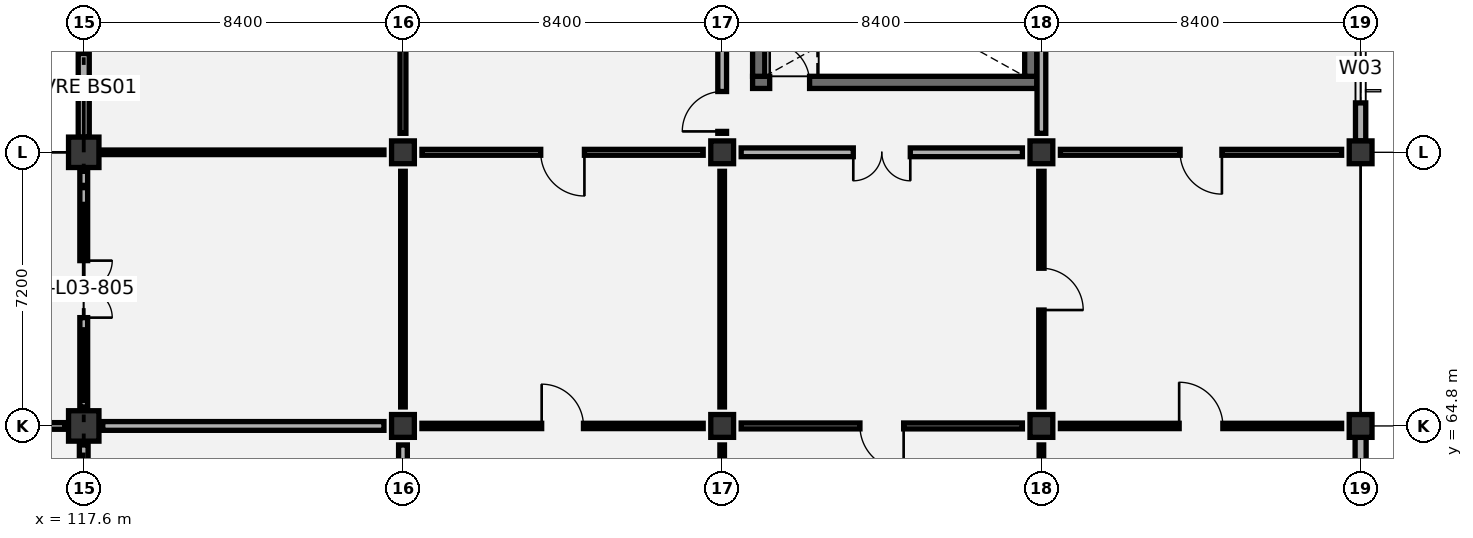
"""IFC4 building model, lengths in metres.
Left out: names, types, materials, properties, quantities, classifications, styles, units other than length and angle.
Written with IfcOpenShell. Run it as: python <this file> out.ifc"""

import sys

from ifc_helpers import new_model, si_unit, direction, frame, frame_2d, origin, origin_2d, place, context, subcontext, project, spatial, rectangle, extrude, element, fill, save


model = new_model("IFC4")
c1 = context("Model", 3, precision=1e-05, world=origin(), true_north=direction((0.0, 1.0)))
c2 = subcontext(c1, "Body", "Model", "MODEL_VIEW")
j1 = project(units=[si_unit("LENGTHUNIT", "METRE"), si_unit("PLANEANGLEUNIT", "RADIAN")], contexts=[c1])
p1 = place(None, origin())
s1 = spatial("IfcSite", under=j1, at=p1, CompositionType="ELEMENT")
p2 = place(p1, origin())
s2 = spatial("IfcBuilding", under=s1, at=p2, CompositionType="ELEMENT")
p3 = place(p2, frame((0.0, 0.0, 16.8)))
s3 = spatial("IfcBuildingStorey", under=s2, at=p3, CompositionType="ELEMENT", Elevation=16.8)
for number, where, z_axis, x_axis in (
    (1, (117.6, 64.8, 0.0), (0.0, 0.0, 1.0), (1.0, 0.0, 0.0)),
    (2, (117.6, 72.0, 0.0), (0.0, 0.0, 1.0), (1.0, 0.0, 0.0)),
):
    element("IfcColumn", number, at=place(p3, frame(where, z_axis=z_axis, x_axis=x_axis)), inside=s3, PredefinedType="COLUMN", context=c2, shape_type="SweptSolid", body=[
        extrude(rectangle(XDim=0.8, YDim=0.8, at=origin_2d()), origin(), (0.0, 0.0, 1.0), 5.4),
    ])
for number, where, z_axis, x_axis in (
    (3, (126.0, 64.8, 0.0), (0.0, 0.0, 1.0), (1.0, 0.0, 0.0)),
    (4, (126.0, 72.0, 0.0), (0.0, 0.0, 1.0), (1.0, 0.0, 0.0)),
    (5, (134.4, 64.8, 0.0), (0.0, 0.0, 1.0), (1.0, 0.0, 0.0)),
    (6, (134.4, 72.0, 0.0), (0.0, 0.0, 1.0), (1.0, 0.0, 0.0)),
    (7, (142.8, 64.8, 0.0), (0.0, 0.0, 1.0), (1.0, 0.0, 0.0)),
    (8, (142.8, 72.0, 0.0), (0.0, 0.0, 1.0), (1.0, 0.0, 0.0)),
    (9, (151.2, 64.8, 0.0), (0.0, 0.0, 1.0), (1.0, 0.0, 0.0)),
    (10, (151.2, 72.0, 0.0), (0.0, 0.0, 1.0), (1.0, 0.0, 0.0)),
):
    element("IfcColumn", number, at=place(p3, frame(where, z_axis=z_axis, x_axis=x_axis)), inside=s3, PredefinedType="COLUMN", context=c2, shape_type="SweptSolid", body=[
        extrude(rectangle(XDim=0.6, YDim=0.6, at=origin_2d()), origin(), (0.0, 0.0, 1.0), 5.4),
    ])
p4 = place(p3, frame((135.2, 73.84, 0.0), z_axis=(0.0, 0.0, 1.0), x_axis=(1.0, 0.0, 0.0)))
e11 = element("IfcWall", 11, at=p4, inside=s3, PredefinedType="SHEAR", context=c2, shape_type="SweptSolid", body=[
    extrude(rectangle(XDim=7.48, YDim=0.32, at=frame_2d((3.74, 0.0))), origin(), (0.0, 0.0, 1.0), 4.825),
])
p5 = place(p4, frame((0.45, 0.0, 0.0)))
e12 = element("IfcOpeningElement", 12, at=p5, cuts=e11, PredefinedType="OPENING", context=c2, shape_type="SweptSolid", body=[
    extrude(rectangle(XDim=1.05, YDim=2.15, at=frame_2d((0.525, 1.075))), frame((0.0, 0.17, 0.0), z_axis=(0.0, -1.0, 0.0), x_axis=(1.0, 0.0, 0.0)), (0.0, 0.0, 1.0), 0.34),
])
for number, where, z_axis, x_axis in (
    (13, (135.36, 74.0, 0.0), (0.0, 0.0, 1.0), (0.0, 1.0, 0.0)),
    (14, (142.52, 74.0, 0.0), (0.0, 0.0, 1.0), (0.0, 1.0, 0.0)),
):
    element("IfcWall", number, at=place(p3, frame(where, z_axis=z_axis, x_axis=x_axis)), inside=s3, PredefinedType="SHEAR", context=c2, shape_type="SweptSolid", body=[
        extrude(rectangle(XDim=3.8, YDim=0.32, at=frame_2d((1.9, 0.0))), origin(), (0.0, 0.0, 1.0), 4.825),
    ])
p6 = place(p3, frame((117.6, 72.4, 0.0), z_axis=(0.0, 0.0, 1.0), x_axis=(0.0, 1.0, 0.0)))
e15 = element("IfcWall", 15, at=p6, inside=s3, PredefinedType="SOLIDWALL", context=c2, shape_type="SweptSolid", body=[
    extrude(rectangle(XDim=6.5, YDim=0.29, at=frame_2d((3.25, 0.0))), origin(), (0.0, 0.0, 1.0), 4.17),
])
p7 = place(p6, frame((2.2, 0.0, 0.9)))
e16 = element("IfcOpeningElement", 16, at=p7, cuts=e15, PredefinedType="OPENING", context=c2, shape_type="SweptSolid", body=[
    extrude(rectangle(XDim=2.1, YDim=1.8, at=frame_2d((1.05, 0.9))), frame((0.0, 0.155, 0.0), z_axis=(0.0, -1.0, 0.0), x_axis=(1.0, 0.0, 0.0)), (0.0, 0.0, 1.0), 0.31),
])
p8 = place(p3, frame((151.2, 57.9, 0.0), z_axis=(0.0, 0.0, 1.0), x_axis=(0.0, 1.0, 0.0)))
e17 = element("IfcWall", 17, at=p8, inside=s3, PredefinedType="SOLIDWALL", context=c2, shape_type="SweptSolid", body=[
    extrude(rectangle(XDim=6.6, YDim=0.29, at=frame_2d((3.3, 0.0))), origin(), (0.0, 0.0, 1.0), 4.395),
])
p9 = place(p8, frame((2.1, 0.0, 0.9)))
e18 = element("IfcOpeningElement", 18, at=p9, cuts=e17, PredefinedType="OPENING", context=c2, shape_type="SweptSolid", body=[
    extrude(rectangle(XDim=2.4, YDim=1.8, at=frame_2d((1.2, 0.9))), frame((0.0, 0.155, 0.0), z_axis=(0.0, -1.0, 0.0), x_axis=(1.0, 0.0, 0.0)), (0.0, 0.0, 1.0), 0.31),
])
p10 = place(p3, frame((151.2, 72.3, 0.0), z_axis=(0.0, 0.0, 1.0), x_axis=(0.0, 1.0, 0.0)))
e19 = element("IfcWall", 19, at=p10, inside=s3, PredefinedType="SOLIDWALL", context=c2, shape_type="SweptSolid", body=[
    extrude(rectangle(XDim=6.6, YDim=0.27, at=frame_2d((3.3, 0.0))), origin(), (0.0, 0.0, 1.0), 4.17),
])
p11 = place(p10, frame((1.0, 0.0, 0.9)))
e20 = element("IfcOpeningElement", 20, at=p11, cuts=e19, PredefinedType="OPENING", context=c2, shape_type="SweptSolid", body=[
    extrude(rectangle(XDim=1.8, YDim=1.8, at=frame_2d((0.9, 0.9))), frame((0.0, 0.145, 0.0), z_axis=(0.0, -1.0, 0.0), x_axis=(1.0, 0.0, 0.0)), (0.0, 0.0, 1.0), 0.29),
])
p12 = place(p10, frame((3.8, 0.0, 0.9)))
e21 = element("IfcOpeningElement", 21, at=p12, cuts=e19, PredefinedType="OPENING", context=c2, shape_type="SweptSolid", body=[
    extrude(rectangle(XDim=1.8, YDim=1.8, at=frame_2d((0.9, 0.9))), frame((0.0, 0.145, 0.0), z_axis=(0.0, -1.0, 0.0), x_axis=(1.0, 0.0, 0.0)), (0.0, 0.0, 1.0), 0.29),
])
p13 = place(p3, frame((117.6, 58.1, 0.0), z_axis=(0.0, 0.0, 1.0), x_axis=(0.0, 1.0, 0.0)))
e22 = element("IfcWall", 22, at=p13, inside=s3, PredefinedType="PARTITIONING", context=c2, shape_type="SweptSolid", body=[
    extrude(rectangle(XDim=6.2, YDim=0.23, at=frame_2d((3.1, 0.0))), origin(), (0.0, 0.0, 1.0), 4.245),
])
p14 = place(p3, frame((109.7, 64.8, 0.0), z_axis=(0.0, 0.0, 1.0), x_axis=(1.0, 0.0, 0.0)))
e23 = element("IfcWall", 23, at=p14, inside=s3, PredefinedType="PARTITIONING", context=c2, shape_type="SweptSolid", body=[
    extrude(rectangle(XDim=7.4, YDim=0.175, at=frame_2d((3.7, 0.0))), origin(), (0.0, 0.0, 1.0), 4.195),
])
p15 = place(p14, frame((3.075, 0.0, 0.0)))
e24 = element("IfcOpeningElement", 24, at=p15, cuts=e23, PredefinedType="OPENING", context=c2, shape_type="SweptSolid", body=[
    extrude(rectangle(XDim=1.25, YDim=2.1, at=frame_2d((0.625, 1.05))), frame((0.0, 0.097, 0.0), z_axis=(0.0, -1.0, 0.0), x_axis=(1.0, 0.0, 0.0)), (0.0, 0.0, 1.0), 0.195),
])
p16 = place(p3, frame((117.6, 65.3, 0.0), z_axis=(0.0, 0.0, 1.0), x_axis=(0.0, 1.0, 0.0)))
e25 = element("IfcWall", 25, at=p16, inside=s3, PredefinedType="PARTITIONING", context=c2, shape_type="SweptSolid", body=[
    extrude(rectangle(XDim=6.2, YDim=0.205, at=frame_2d((3.1, 0.0))), origin(), (0.0, 0.0, 1.0), 4.655),
])
p17 = place(p16, frame((2.35, 0.0, 0.0)))
e26 = element("IfcOpeningElement", 26, at=p17, cuts=e25, PredefinedType="OPENING", context=c2, shape_type="SweptSolid", body=[
    extrude(rectangle(XDim=1.5, YDim=2.2, at=frame_2d((0.75, 1.1))), frame((0.0, 0.113, 0.0), z_axis=(0.0, -1.0, 0.0), x_axis=(1.0, 0.0, 0.0)), (0.0, 0.0, 1.0), 0.225),
])
p18 = place(p3, frame((126.0, 58.1, 0.0), z_axis=(0.0, 0.0, 1.0), x_axis=(0.0, 1.0, 0.0)))
e27 = element("IfcWall", 27, at=p18, inside=s3, PredefinedType="PARTITIONING", context=c2, shape_type="SweptSolid", body=[
    extrude(rectangle(XDim=6.2, YDim=0.23, at=frame_2d((3.1, 0.0))), origin(), (0.0, 0.0, 1.0), 4.755),
])
p19 = place(p3, frame((118.1, 64.8, 0.0), z_axis=(0.0, 0.0, 1.0), x_axis=(1.0, 0.0, 0.0)))
e28 = element("IfcWall", 28, at=p19, inside=s3, PredefinedType="PARTITIONING", context=c2, shape_type="SweptSolid", body=[
    extrude(rectangle(XDim=7.4, YDim=0.23, at=frame_2d((3.7, 0.0))), origin(), (0.0, 0.0, 1.0), 4.295),
])
p20 = place(p3, frame((126.0, 65.3, 0.0), z_axis=(0.0, 0.0, 1.0), x_axis=(0.0, 1.0, 0.0)))
e29 = element("IfcWall", 29, at=p20, inside=s3, PredefinedType="PARTITIONING", context=c2, shape_type="SweptSolid", body=[
    extrude(rectangle(XDim=6.2, YDim=0.12, at=frame_2d((3.1, 0.0))), origin(), (0.0, 0.0, 1.0), 4.345),
])
p21 = place(p3, frame((118.1, 72.0, 0.0), z_axis=(0.0, 0.0, 1.0), x_axis=(1.0, 0.0, 0.0)))
e30 = element("IfcWall", 30, at=p21, inside=s3, PredefinedType="PARTITIONING", context=c2, shape_type="SweptSolid", body=[
    extrude(rectangle(XDim=7.4, YDim=0.12, at=frame_2d((3.7, 0.0))), origin(), (0.0, 0.0, 1.0), 4.07),
])
p22 = place(p3, frame((126.0, 72.5, 0.0), z_axis=(0.0, 0.0, 1.0), x_axis=(0.0, 1.0, 0.0)))
e31 = element("IfcWall", 31, at=p22, inside=s3, PredefinedType="PARTITIONING", context=c2, shape_type="SweptSolid", body=[
    extrude(rectangle(XDim=6.2, YDim=0.155, at=frame_2d((3.1, 0.0))), origin(), (0.0, 0.0, 1.0), 4.32),
])
p23 = place(p22, frame((2.525, 0.0, 0.0)))
e32 = element("IfcOpeningElement", 32, at=p23, cuts=e31, PredefinedType="OPENING", context=c2, shape_type="SweptSolid", body=[
    extrude(rectangle(XDim=1.15, YDim=2.1, at=frame_2d((0.575, 1.05))), frame((0.0, 0.087, 0.0), z_axis=(0.0, -1.0, 0.0), x_axis=(1.0, 0.0, 0.0)), (0.0, 0.0, 1.0), 0.175),
])
p24 = place(p3, frame((134.4, 58.1, 0.0), z_axis=(0.0, 0.0, 1.0), x_axis=(0.0, 1.0, 0.0)))
e33 = element("IfcWall", 33, at=p24, inside=s3, PredefinedType="PARTITIONING", context=c2, shape_type="SweptSolid", body=[
    extrude(rectangle(XDim=6.2, YDim=0.12, at=frame_2d((3.1, 0.0))), origin(), (0.0, 0.0, 1.0), 4.345),
])
p25 = place(p3, frame((126.5, 64.8, 0.0), z_axis=(0.0, 0.0, 1.0), x_axis=(1.0, 0.0, 0.0)))
e34 = element("IfcWall", 34, at=p25, inside=s3, PredefinedType="PARTITIONING", context=c2, shape_type="SweptSolid", body=[
    extrude(rectangle(XDim=7.4, YDim=0.14, at=frame_2d((3.7, 0.0))), origin(), (0.0, 0.0, 1.0), 4.295),
])
p26 = place(p25, frame((3.15, 0.0, 0.0)))
e35 = element("IfcOpeningElement", 35, at=p26, cuts=e34, PredefinedType="OPENING", context=c2, shape_type="SweptSolid", body=[
    extrude(rectangle(XDim=1.1, YDim=2.1, at=frame_2d((0.55, 1.05))), frame((0.0, 0.08, 0.0), z_axis=(0.0, -1.0, 0.0), x_axis=(1.0, 0.0, 0.0)), (0.0, 0.0, 1.0), 0.16),
])
p27 = place(p3, frame((134.4, 65.3, 0.0), z_axis=(0.0, 0.0, 1.0), x_axis=(0.0, 1.0, 0.0)))
e36 = element("IfcWall", 36, at=p27, inside=s3, PredefinedType="PARTITIONING", context=c2, shape_type="SweptSolid", body=[
    extrude(rectangle(XDim=6.2, YDim=0.12, at=frame_2d((3.1, 0.0))), origin(), (0.0, 0.0, 1.0), 4.545),
])
p28 = place(p3, frame((126.5, 72.0, 0.0), z_axis=(0.0, 0.0, 1.0), x_axis=(1.0, 0.0, 0.0)))
e37 = element("IfcWall", 37, at=p28, inside=s3, PredefinedType="PARTITIONING", context=c2, shape_type="SweptSolid", body=[
    extrude(rectangle(XDim=7.4, YDim=0.155, at=frame_2d((3.7, 0.0))), origin(), (0.0, 0.0, 1.0), 4.07),
])
p29 = place(p28, frame((3.125, 0.0, 0.0)))
e38 = element("IfcOpeningElement", 38, at=p29, cuts=e37, PredefinedType="OPENING", context=c2, shape_type="SweptSolid", body=[
    extrude(rectangle(XDim=1.15, YDim=2.1, at=frame_2d((0.575, 1.05))), frame((0.0, 0.087, 0.0), z_axis=(0.0, -1.0, 0.0), x_axis=(1.0, 0.0, 0.0)), (0.0, 0.0, 1.0), 0.175),
])
p30 = place(p3, frame((134.4, 72.5, 0.0), z_axis=(0.0, 0.0, 1.0), x_axis=(0.0, 1.0, 0.0)))
e39 = element("IfcWall", 39, at=p30, inside=s3, PredefinedType="PARTITIONING", context=c2, shape_type="SweptSolid", body=[
    extrude(rectangle(XDim=6.2, YDim=0.23, at=frame_2d((3.1, 0.0))), origin(), (0.0, 0.0, 1.0), 4.12),
])
p31 = place(p30, frame((0.05, 0.0, 0.0)))
e40 = element("IfcOpeningElement", 40, at=p31, cuts=e39, PredefinedType="OPENING", context=c2, shape_type="SweptSolid", body=[
    extrude(rectangle(XDim=1.05, YDim=2.15, at=frame_2d((0.525, 1.075))), frame((0.0, 0.125, 0.0), z_axis=(0.0, -1.0, 0.0), x_axis=(1.0, 0.0, 0.0)), (0.0, 0.0, 1.0), 0.25),
])
p32 = place(p3, frame((142.8, 58.1, 0.0), z_axis=(0.0, 0.0, 1.0), x_axis=(0.0, 1.0, 0.0)))
e41 = element("IfcWall", 41, at=p32, inside=s3, PredefinedType="PARTITIONING", context=c2, shape_type="SweptSolid", body=[
    extrude(rectangle(XDim=6.2, YDim=0.12, at=frame_2d((3.1, 0.0))), origin(), (0.0, 0.0, 1.0), 4.545),
])
p33 = place(p3, frame((134.9, 64.8, 0.0), z_axis=(0.0, 0.0, 1.0), x_axis=(1.0, 0.0, 0.0)))
e42 = element("IfcWall", 42, at=p33, inside=s3, PredefinedType="PARTITIONING", context=c2, shape_type="SweptSolid", body=[
    extrude(rectangle(XDim=7.4, YDim=0.155, at=frame_2d((3.7, 0.0))), origin(), (0.0, 0.0, 1.0), 4.295),
])
p34 = place(p33, frame((3.125, 0.0, 0.0)))
e43 = element("IfcOpeningElement", 43, at=p34, cuts=e42, PredefinedType="OPENING", context=c2, shape_type="SweptSolid", body=[
    extrude(rectangle(XDim=1.15, YDim=2.1, at=frame_2d((0.575, 1.05))), frame((0.0, 0.087, 0.0), z_axis=(0.0, -1.0, 0.0), x_axis=(1.0, 0.0, 0.0)), (0.0, 0.0, 1.0), 0.175),
])
p35 = place(p3, frame((142.8, 65.3, 0.0), z_axis=(0.0, 0.0, 1.0), x_axis=(0.0, 1.0, 0.0)))
e44 = element("IfcWall", 44, at=p35, inside=s3, PredefinedType="PARTITIONING", context=c2, shape_type="SweptSolid", body=[
    extrude(rectangle(XDim=6.2, YDim=0.14, at=frame_2d((3.1, 0.0))), origin(), (0.0, 0.0, 1.0), 4.345),
])
p36 = place(p35, frame((2.55, 0.0, 0.0)))
e45 = element("IfcOpeningElement", 45, at=p36, cuts=e44, PredefinedType="OPENING", context=c2, shape_type="SweptSolid", body=[
    extrude(rectangle(XDim=1.1, YDim=2.1, at=frame_2d((0.55, 1.05))), frame((0.0, 0.08, 0.0), z_axis=(0.0, -1.0, 0.0), x_axis=(1.0, 0.0, 0.0)), (0.0, 0.0, 1.0), 0.16),
])
p37 = place(p3, frame((134.9, 72.0, 0.0), z_axis=(0.0, 0.0, 1.0), x_axis=(1.0, 0.0, 0.0)))
e46 = element("IfcWall", 46, at=p37, inside=s3, PredefinedType="PARTITIONING", context=c2, shape_type="SweptSolid", body=[
    extrude(rectangle(XDim=7.4, YDim=0.23, at=frame_2d((3.7, 0.0))), origin(), (0.0, 0.0, 1.0), 4.07),
])
p38 = place(p37, frame((2.95, 0.0, 0.0)))
e47 = element("IfcOpeningElement", 47, at=p38, cuts=e46, PredefinedType="OPENING", context=c2, shape_type="SweptSolid", body=[
    extrude(rectangle(XDim=1.5, YDim=2.15, at=frame_2d((0.75, 1.075))), frame((0.0, 0.125, 0.0), z_axis=(0.0, -1.0, 0.0), x_axis=(1.0, 0.0, 0.0)), (0.0, 0.0, 1.0), 0.25),
])
p39 = place(p3, frame((142.8, 72.5, 0.0), z_axis=(0.0, 0.0, 1.0), x_axis=(0.0, 1.0, 0.0)))
e48 = element("IfcWall", 48, at=p39, inside=s3, PredefinedType="PARTITIONING", context=c2, shape_type="SweptSolid", body=[
    extrude(rectangle(XDim=6.2, YDim=0.23, at=frame_2d((3.1, 0.0))), origin(), (0.0, 0.0, 1.0), 4.42),
])
p40 = place(p3, frame((143.3, 64.8, 0.0), z_axis=(0.0, 0.0, 1.0), x_axis=(1.0, 0.0, 0.0)))
e49 = element("IfcWall", 49, at=p40, inside=s3, PredefinedType="PARTITIONING", context=c2, shape_type="SweptSolid", body=[
    extrude(rectangle(XDim=7.4, YDim=0.14, at=frame_2d((3.7, 0.0))), origin(), (0.0, 0.0, 1.0), 4.295),
])
p41 = place(p40, frame((3.125, 0.0, 0.0)))
e50 = element("IfcOpeningElement", 50, at=p41, cuts=e49, PredefinedType="OPENING", context=c2, shape_type="SweptSolid", body=[
    extrude(rectangle(XDim=1.15, YDim=2.1, at=frame_2d((0.575, 1.05))), frame((0.0, 0.08, 0.0), z_axis=(0.0, -1.0, 0.0), x_axis=(1.0, 0.0, 0.0)), (0.0, 0.0, 1.0), 0.16),
])
p42 = place(p3, frame((143.3, 72.0, 0.0), z_axis=(0.0, 0.0, 1.0), x_axis=(1.0, 0.0, 0.0)))
e51 = element("IfcWall", 51, at=p42, inside=s3, PredefinedType="PARTITIONING", context=c2, shape_type="SweptSolid", body=[
    extrude(rectangle(XDim=7.4, YDim=0.155, at=frame_2d((3.7, 0.0))), origin(), (0.0, 0.0, 1.0), 4.07),
])
p43 = place(p42, frame((3.15, 0.0, 0.0)))
e52 = element("IfcOpeningElement", 52, at=p43, cuts=e51, PredefinedType="OPENING", context=c2, shape_type="SweptSolid", body=[
    extrude(rectangle(XDim=1.1, YDim=2.1, at=frame_2d((0.55, 1.05))), frame((0.0, 0.087, 0.0), z_axis=(0.0, -1.0, 0.0), x_axis=(1.0, 0.0, 0.0)), (0.0, 0.0, 1.0), 0.175),
])
p44 = place(p7, origin())
e53 = element("IfcWindow", 53, at=p44, inside=s3, PartitioningType="SINGLE_PANEL", PredefinedType="WINDOW", context=c2, shape_type="SweptSolid", body=[
    extrude(rectangle(XDim=2.1, YDim=1.8, at=frame_2d((1.05, 0.9))), frame((0.0, 0.03, 0.0), z_axis=(0.0, -1.0, 0.0), x_axis=(1.0, 0.0, 0.0)), (0.0, 0.0, 1.0), 0.06),
])
fill(e16, e53)
p45 = place(p11, origin())
e54 = element("IfcWindow", 54, at=p45, inside=s3, PartitioningType="SINGLE_PANEL", PredefinedType="WINDOW", context=c2, shape_type="SweptSolid", body=[
    extrude(rectangle(XDim=1.8, YDim=1.8, at=frame_2d((0.9, 0.9))), frame((0.0, 0.03, 0.0), z_axis=(0.0, -1.0, 0.0), x_axis=(1.0, 0.0, 0.0)), (0.0, 0.0, 1.0), 0.06),
])
fill(e20, e54)
p46 = place(p5, origin())
e55 = element("IfcDoor", 55, at=p46, inside=s3, OperationType="SINGLE_SWING_LEFT", PredefinedType="DOOR", context=c2, shape_type="SweptSolid", body=[
    extrude(rectangle(XDim=1.05, YDim=2.15, at=frame_2d((0.525, 1.075))), frame((0.0, 0.025, 0.0), z_axis=(0.0, -1.0, 0.0), x_axis=(1.0, 0.0, 0.0)), (0.0, 0.0, 1.0), 0.05),
])
fill(e12, e55)
p47 = place(p17, frame((1.5, 0.0, 0.0), z_axis=(0.0, 0.0, 1.0), x_axis=(-1.0, 0.0, 0.0)))
e56 = element("IfcDoor", 56, at=p47, inside=s3, OperationType="DOUBLE_DOOR_SINGLE_SWING", PredefinedType="DOOR", context=c2, shape_type="SweptSolid", body=[
    extrude(rectangle(XDim=1.5, YDim=2.2, at=frame_2d((0.75, 1.1))), frame((0.0, 0.025, 0.0), z_axis=(0.0, -1.0, 0.0), x_axis=(1.0, 0.0, 0.0)), (0.0, 0.0, 1.0), 0.05),
])
fill(e26, e56)
p48 = place(p26, origin())
e57 = element("IfcDoor", 57, at=p48, inside=s3, OperationType="SINGLE_SWING_LEFT", PredefinedType="DOOR", context=c2, shape_type="SweptSolid", body=[
    extrude(rectangle(XDim=1.1, YDim=2.1, at=frame_2d((0.55, 1.05))), frame((0.0, 0.025, 0.0), z_axis=(0.0, -1.0, 0.0), x_axis=(1.0, 0.0, 0.0)), (0.0, 0.0, 1.0), 0.05),
])
fill(e35, e57)
p49 = place(p29, frame((1.15, 0.0, 0.0), z_axis=(0.0, 0.0, 1.0), x_axis=(-1.0, 0.0, 0.0)))
e58 = element("IfcDoor", 58, at=p49, inside=s3, OperationType="SINGLE_SWING_LEFT", PredefinedType="DOOR", context=c2, shape_type="SweptSolid", body=[
    extrude(rectangle(XDim=1.15, YDim=2.1, at=frame_2d((0.575, 1.05))), frame((0.0, 0.025, 0.0), z_axis=(0.0, -1.0, 0.0), x_axis=(1.0, 0.0, 0.0)), (0.0, 0.0, 1.0), 0.05),
])
fill(e38, e58)
p50 = place(p31, origin())
e59 = element("IfcDoor", 59, at=p50, inside=s3, OperationType="SINGLE_SWING_LEFT", PredefinedType="DOOR", context=c2, shape_type="SweptSolid", body=[
    extrude(rectangle(XDim=1.05, YDim=2.15, at=frame_2d((0.525, 1.075))), frame((0.0, 0.025, 0.0), z_axis=(0.0, -1.0, 0.0), x_axis=(1.0, 0.0, 0.0)), (0.0, 0.0, 1.0), 0.05),
])
fill(e40, e59)
p51 = place(p34, frame((1.15, 0.0, 0.0), z_axis=(0.0, 0.0, 1.0), x_axis=(-1.0, 0.0, 0.0)))
e60 = element("IfcDoor", 60, at=p51, inside=s3, OperationType="SINGLE_SWING_LEFT", PredefinedType="DOOR", context=c2, shape_type="SweptSolid", body=[
    extrude(rectangle(XDim=1.15, YDim=2.1, at=frame_2d((0.575, 1.05))), frame((0.0, 0.025, 0.0), z_axis=(0.0, -1.0, 0.0), x_axis=(1.0, 0.0, 0.0)), (0.0, 0.0, 1.0), 0.05),
])
fill(e43, e60)
p52 = place(p36, frame((1.1, 0.0, 0.0), z_axis=(0.0, 0.0, 1.0), x_axis=(-1.0, 0.0, 0.0)))
e61 = element("IfcDoor", 61, at=p52, inside=s3, OperationType="SINGLE_SWING_RIGHT", PredefinedType="DOOR", context=c2, shape_type="SweptSolid", body=[
    extrude(rectangle(XDim=1.1, YDim=2.1, at=frame_2d((0.55, 1.05))), frame((0.0, 0.025, 0.0), z_axis=(0.0, -1.0, 0.0), x_axis=(1.0, 0.0, 0.0)), (0.0, 0.0, 1.0), 0.05),
])
fill(e45, e61)
p53 = place(p38, frame((1.5, 0.0, 0.0), z_axis=(0.0, 0.0, 1.0), x_axis=(-1.0, 0.0, 0.0)))
e62 = element("IfcDoor", 62, at=p53, inside=s3, OperationType="DOUBLE_DOOR_SINGLE_SWING", PredefinedType="DOOR", context=c2, shape_type="SweptSolid", body=[
    extrude(rectangle(XDim=1.5, YDim=2.15, at=frame_2d((0.75, 1.075))), frame((0.0, 0.025, 0.0), z_axis=(0.0, -1.0, 0.0), x_axis=(1.0, 0.0, 0.0)), (0.0, 0.0, 1.0), 0.05),
])
fill(e47, e62)
p54 = place(p41, origin())
e63 = element("IfcDoor", 63, at=p54, inside=s3, OperationType="SINGLE_SWING_LEFT", PredefinedType="DOOR", context=c2, shape_type="SweptSolid", body=[
    extrude(rectangle(XDim=1.15, YDim=2.1, at=frame_2d((0.575, 1.05))), frame((0.0, 0.025, 0.0), z_axis=(0.0, -1.0, 0.0), x_axis=(1.0, 0.0, 0.0)), (0.0, 0.0, 1.0), 0.05),
])
fill(e50, e63)
p55 = place(p43, frame((1.1, 0.0, 0.0), z_axis=(0.0, 0.0, 1.0), x_axis=(-1.0, 0.0, 0.0)))
e64 = element("IfcDoor", 64, at=p55, inside=s3, OperationType="SINGLE_SWING_LEFT", PredefinedType="DOOR", context=c2, shape_type="SweptSolid", body=[
    extrude(rectangle(XDim=1.1, YDim=2.1, at=frame_2d((0.55, 1.05))), frame((0.0, 0.025, 0.0), z_axis=(0.0, -1.0, 0.0), x_axis=(1.0, 0.0, 0.0)), (0.0, 0.0, 1.0), 0.05),
])
fill(e52, e64)
save(model, sys.argv[1])
